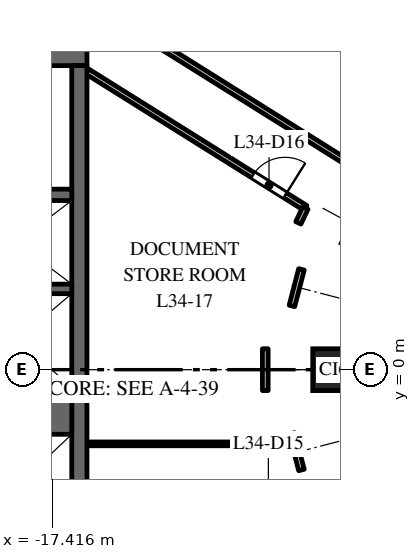
"""IFC4 building model, lengths in metres.
Left out: names, types, materials, properties, quantities, classifications, styles, units other than length and angle.
Written with IfcOpenShell. Run it as: python <this file> out.ifc"""

import sys

from ifc_helpers import new_model, si_unit, direction, frame, frame_2d, origin, origin_2d, place, context, subcontext, project, spatial, rectangle, extrude, element, fill, save


model = new_model("IFC4")
c1 = context("Model", 3, precision=1e-05, world=origin(), true_north=direction((0.0, 1.0)))
c2 = subcontext(c1, "Body", "Model", "MODEL_VIEW")
j1 = project(units=[si_unit("LENGTHUNIT", "METRE"), si_unit("PLANEANGLEUNIT", "RADIAN")], contexts=[c1])
p1 = place(None, origin())
s1 = spatial("IfcSite", under=j1, at=p1, CompositionType="ELEMENT")
p2 = place(p1, origin())
s2 = spatial("IfcBuilding", under=s1, at=p2, CompositionType="ELEMENT")
p3 = place(p2, frame((0.0, 0.0, 150.0)))
s3 = spatial("IfcBuildingStorey", under=s2, at=p3, CompositionType="ELEMENT", Elevation=150.0)
p4 = place(p3, frame((-10.008, 0.0, 0.0), z_axis=(0.0, 0.0, 1.0), x_axis=(0.0, -1.0, 0.0)))
e1 = element("IfcColumn", 1, at=p4, inside=s3, PredefinedType="COLUMN", context=c2, shape_type="SweptSolid", body=[
    extrude(rectangle(XDim=1.1, YDim=1.1, at=origin_2d()), origin(), (0.0, 0.0, 1.0), 4.0),
])
p5 = place(p3, frame((-16.5, 8.25, 0.0), z_axis=(0.0, 0.0, 1.0), x_axis=(-1.0, 0.0, 0.0)))
e2 = element("IfcWall", 2, at=p5, inside=s3, PredefinedType="SHEAR", context=c2, shape_type="SweptSolid", body=[
    extrude(rectangle(XDim=15.0, YDim=0.5, at=frame_2d((7.5, 0.0))), origin(), (0.0, 0.0, 1.0), 3.7),
])
p6 = place(p5, frame((6.9, 0.0, 0.0)))
e3 = element("IfcOpeningElement", 3, at=p6, cuts=e2, PredefinedType="OPENING", context=c2, shape_type="SweptSolid", body=[
    extrude(rectangle(XDim=1.2, YDim=2.1, at=frame_2d((0.6, 1.05))), frame((0.0, 0.26, 0.0), z_axis=(0.0, -1.0, 0.0), x_axis=(1.0, 0.0, 0.0)), (0.0, 0.0, 1.0), 0.52),
])
p7 = place(p5, frame((12.425, 0.0, 0.0)))
e4 = element("IfcOpeningElement", 4, at=p7, cuts=e2, PredefinedType="OPENING", context=c2, shape_type="SweptSolid", body=[
    extrude(rectangle(XDim=0.9, YDim=2.1, at=frame_2d((0.45, 1.05))), frame((0.0, 0.26, 0.0), z_axis=(0.0, -1.0, 0.0), x_axis=(1.0, 0.0, 0.0)), (0.0, 0.0, 1.0), 0.52),
])
p8 = place(p3, frame((-16.7, -8.0, 0.0), z_axis=(0.0, 0.0, 1.0), x_axis=(0.0, 1.0, 0.0)))
e5 = element("IfcWall", 5, at=p8, inside=s3, PredefinedType="SHEAR", context=c2, shape_type="SweptSolid", body=[
    extrude(rectangle(XDim=16.0, YDim=0.4, at=frame_2d((8.0, 0.0))), origin(), (0.0, 0.0, 1.0), 3.7),
])
p9 = place(p3, frame((-16.9, -1.075, 0.0), z_axis=(0.0, 0.0, 1.0), x_axis=(-1.0, 0.0, 0.0)))
e6 = element("IfcWall", 6, at=p9, inside=s3, PredefinedType="SHEAR", context=c2, shape_type="SweptSolid", body=[
    extrude(rectangle(XDim=2.9, YDim=1.25, at=frame_2d((1.45, 0.0))), origin(), (0.0, 0.0, 1.0), 3.7),
])
p10 = place(p3, frame((-16.9, 2.125, 0.0), z_axis=(0.0, 0.0, 1.0), x_axis=(-1.0, 0.0, 0.0)))
e7 = element("IfcWall", 7, at=p10, inside=s3, PredefinedType="SHEAR", context=c2, shape_type="SweptSolid", body=[
    extrude(rectangle(XDim=2.9, YDim=0.25, at=frame_2d((1.45, 0.0))), origin(), (0.0, 0.0, 1.0), 3.7),
])
p11 = place(p3, frame((-16.9, 4.6, 0.0), z_axis=(0.0, 0.0, 1.0), x_axis=(-1.0, 0.0, 0.0)))
e8 = element("IfcWall", 8, at=p11, inside=s3, PredefinedType="SHEAR", context=c2, shape_type="SweptSolid", body=[
    extrude(rectangle(XDim=6.18, YDim=0.3, at=frame_2d((3.09, 0.0))), origin(), (0.0, 0.0, 1.0), 3.7),
])
p12 = place(p11, frame((4.9, 0.0, 0.0)))
e9 = element("IfcOpeningElement", 9, at=p12, cuts=e8, PredefinedType="OPENING", context=c2, shape_type="SweptSolid", body=[
    extrude(rectangle(XDim=1.1, YDim=2.1, at=frame_2d((0.55, 1.05))), frame((0.0, 0.16, 0.0), z_axis=(0.0, -1.0, 0.0), x_axis=(1.0, 0.0, 0.0)), (0.0, 0.0, 1.0), 0.32),
])
p13 = place(p3, frame((-16.5, -1.952, 0.0), z_axis=(0.0, 0.0, 1.0), x_axis=(1.0, 0.0, 0.0)))
e10 = element("IfcWall", 10, at=p13, inside=s3, PredefinedType="PARTITIONING", context=c2, shape_type="SweptSolid", body=[
    extrude(rectangle(XDim=5.384, YDim=0.1, at=frame_2d((2.692, 0.0))), origin(), (0.0, 0.0, 1.0), 3.7),
])
p14 = place(p3, frame((-16.5, 7.851, 0.0), z_axis=(0.0, 0.0, 1.0), x_axis=(0.847690706888, -0.530490777917, 0.0)))
e11 = element("IfcWall", 11, at=p14, inside=s3, PredefinedType="PARTITIONING", context=c2, shape_type="SweptSolid", body=[
    extrude(rectangle(XDim=6.781, YDim=0.15, at=frame_2d((3.39, 0.0))), origin(), (0.0, 0.0, 1.0), 3.7),
])
p15 = place(p14, frame((5.151, 0.0, 0.0)))
e12 = element("IfcOpeningElement", 12, at=p15, cuts=e11, PredefinedType="OPENING", context=c2, shape_type="SweptSolid", body=[
    extrude(rectangle(XDim=1.0, YDim=2.1, at=frame_2d((0.5, 1.05))), frame((0.0, 0.085, 0.0), z_axis=(0.0, -1.0, 0.0), x_axis=(1.0, 0.0, 0.0)), (0.0, 0.0, 1.0), 0.17),
])
p16 = place(p3, frame((-15.089, 8.856, 0.0), z_axis=(0.0, 0.0, 1.0), x_axis=(0.847611500167, -0.53061732424, 0.0)))
e13 = element("IfcWall", 13, at=p16, inside=s3, PredefinedType="PARTITIONING", context=c2, shape_type="SweptSolid", body=[
    extrude(rectangle(XDim=6.315, YDim=0.15, at=frame_2d((3.158, 0.0))), origin(), (0.0, 0.0, 1.0), 3.7),
])
p17 = place(p3, frame((-12.666, 10.669, 0.0), z_axis=(0.0, 0.0, 1.0), x_axis=(0.925451421732, -0.378866290416, 0.0)))
e14 = element("IfcWall", 14, at=p17, inside=s3, PredefinedType="PARTITIONING", context=c2, shape_type="SweptSolid", body=[
    extrude(rectangle(XDim=6.189, YDim=0.1, at=frame_2d((3.095, 0.0))), origin(), (0.0, 0.0, 1.0), 3.7),
])
p18 = place(p3, frame((-11.808, -0.55, 0.0), z_axis=(0.0, 0.0, 1.0), x_axis=(0.0, 1.0, 0.0)))
e15 = element("IfcWall", 15, at=p18, inside=s3, PredefinedType="PARTITIONING", context=c2, shape_type="SweptSolid", body=[
    extrude(rectangle(XDim=1.1, YDim=0.15, at=frame_2d((0.55, 0.0))), origin(), (0.0, 0.0, 1.0), 3.7),
])
for number, where, z_axis, x_axis in (
    (16, (-11.106, -1.677, 0.0), (0.0, 0.0, 1.0), (0.252, -0.968, 0.0)),
    (17, (-11.106, 1.677, 0.0), (0.0, 0.0, 1.0), (0.252, 0.968, 0.0)),
):
    element("IfcWall", number, at=place(p3, frame(where, z_axis=z_axis, x_axis=x_axis)), inside=s3, PredefinedType="PARTITIONING", context=c2, shape_type="SweptSolid", body=[
        extrude(rectangle(XDim=0.994, YDim=0.15, at=frame_2d((0.497, 0.0))), origin(), (0.0, 0.0, 1.0), 3.7),
    ])
p19 = place(p3, frame((-10.938, 3.863, 0.0), z_axis=(0.0, 0.0, 1.0), x_axis=(0.429758433873, 0.90294390109, 0.0)))
e18 = element("IfcWall", 18, at=p19, inside=s3, PredefinedType="PARTITIONING", context=c2, shape_type="SweptSolid", body=[
    extrude(rectangle(XDim=0.433, YDim=0.15, at=frame_2d((0.216, 0.0))), origin(), (0.0, 0.0, 1.0), 3.7),
])
p20 = place(p15, origin())
e19 = element("IfcDoor", 19, at=p20, inside=s3, OperationType="SINGLE_SWING_RIGHT", PredefinedType="DOOR", context=c2, shape_type="SweptSolid", body=[
    extrude(rectangle(XDim=1.0, YDim=2.1, at=frame_2d((0.5, 1.05))), frame((0.0, 0.025, 0.0), z_axis=(0.0, -1.0, 0.0), x_axis=(1.0, 0.0, 0.0)), (0.0, 0.0, 1.0), 0.05),
])
fill(e12, e19)
save(model, sys.argv[1])
